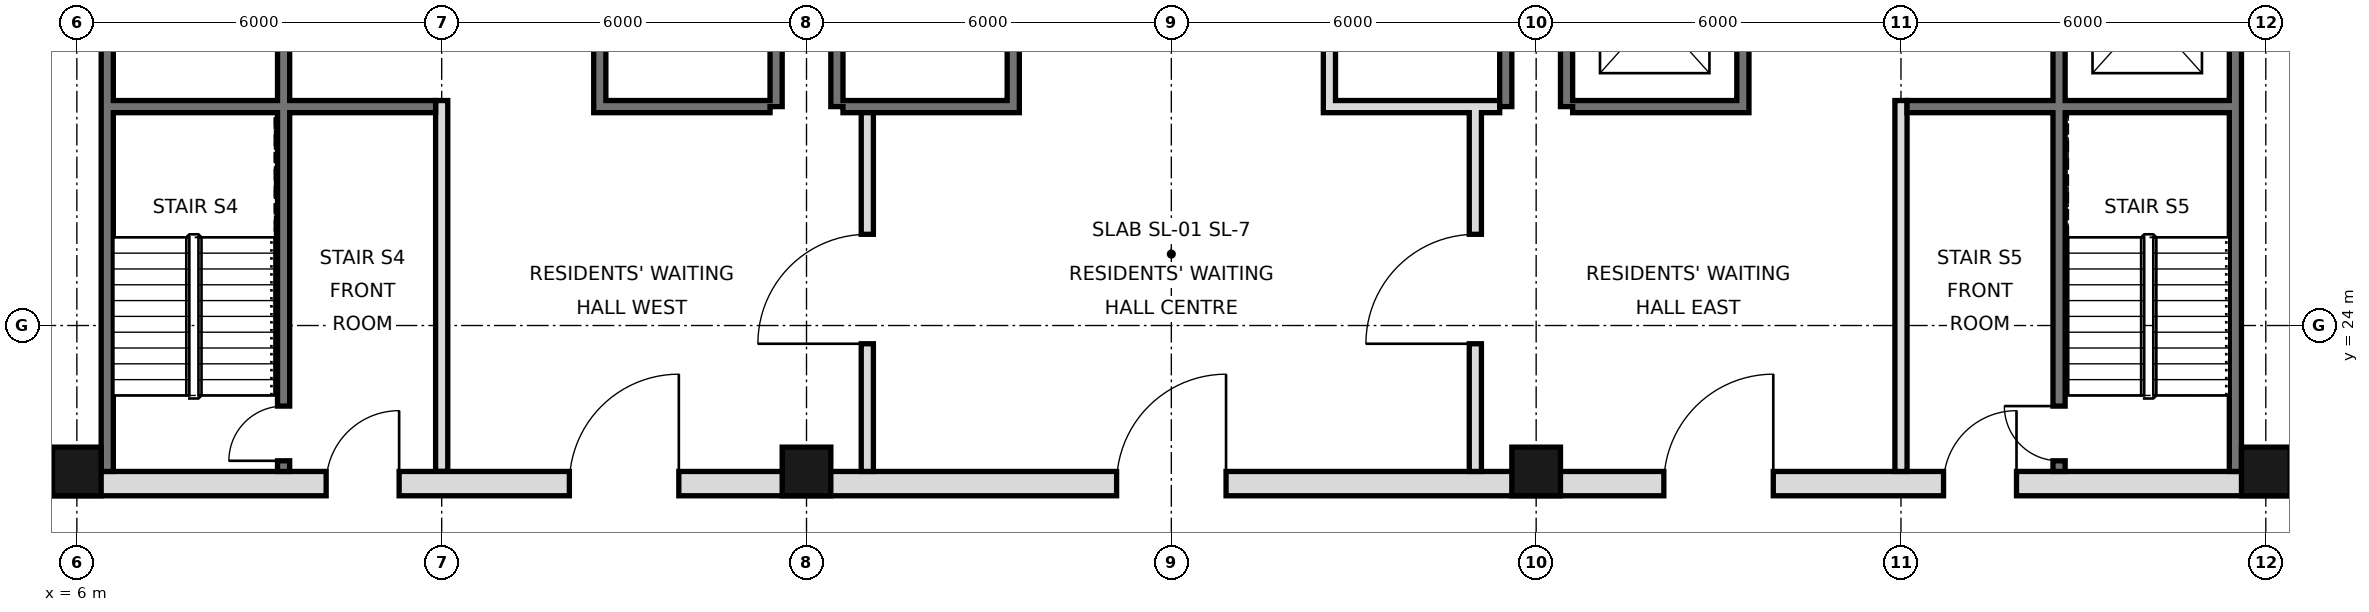
"""IFC4 building model, lengths in metres.
Left out: names, types, materials, properties, quantities, classifications, styles, units other than length and angle.
Written with IfcOpenShell. Run it as: python <this file> out.ifc"""

import sys

from ifc_helpers import new_model, si_unit, direction, frame, frame_2d, origin, origin_2d, place, context, subcontext, project, spatial, rectangle, hollow_rectangle, extrude, element, fill, save


model = new_model("IFC4")
c1 = context("Model", 3, precision=1e-05, world=origin(), true_north=direction((0.0, 1.0)))
c2 = subcontext(c1, "Body", "Model", "MODEL_VIEW")
j1 = project(units=[si_unit("LENGTHUNIT", "METRE"), si_unit("PLANEANGLEUNIT", "RADIAN")], contexts=[c1])
p1 = place(None, origin())
s1 = spatial("IfcSite", under=j1, at=p1, CompositionType="ELEMENT")
p2 = place(p1, origin())
s2 = spatial("IfcBuilding", under=s1, at=p2, CompositionType="ELEMENT")
p3 = place(p2, frame((0.0, 0.0, 167.2)))
s3 = spatial("IfcBuildingStorey", under=s2, at=p3, CompositionType="ELEMENT", Elevation=167.2)
for number, where, z_axis, x_axis in (
    (1, (6.0, 21.6, 0.0), (0.0, 0.0, 1.0), (1.0, 0.0, 0.0)),
    (2, (18.0, 21.6, 0.0), (0.0, 0.0, 1.0), (1.0, 0.0, 0.0)),
    (3, (30.0, 21.6, 0.0), (0.0, 0.0, 1.0), (1.0, 0.0, 0.0)),
    (4, (42.0, 21.6, 0.0), (0.0, 0.0, 1.0), (1.0, 0.0, 0.0)),
):
    element("IfcColumn", number, at=place(p3, frame(where, z_axis=z_axis, x_axis=x_axis)), inside=s3, PredefinedType="COLUMN", context=c2, shape_type="SweptSolid", body=[
        extrude(hollow_rectangle(XDim=0.8, YDim=0.8, WallThickness=0.045, at=origin_2d()), origin(), (0.0, 0.0, 1.0), 3.6),
    ])
for number, where, z_axis, x_axis in (
    (5, (6.5, 21.6, 0.0), (0.0, 0.0, 1.0), (0.0, 1.0, 0.0)),
    (6, (41.5, 21.6, 0.0), (0.0, 0.0, 1.0), (0.0, 1.0, 0.0)),
):
    element("IfcWall", number, at=place(p3, frame(where, z_axis=z_axis, x_axis=x_axis)), inside=s3, PredefinedType="SOLIDWALL", context=c2, shape_type="SweptSolid", body=[
        extrude(rectangle(XDim=23.5, YDim=0.2, at=frame_2d((11.75, 0.0))), origin(), (0.0, 0.0, 1.0), 3.42),
    ])
for number, where, z_axis, x_axis in (
    (7, (17.5, 27.6, 0.0), (0.0, 0.0, 1.0), (0.0, 1.0, 0.0)),
    (8, (18.5, 27.6, 0.0), (0.0, 0.0, 1.0), (0.0, 1.0, 0.0)),
    (9, (29.5, 27.6, 0.0), (0.0, 0.0, 1.0), (0.0, 1.0, 0.0)),
    (10, (30.5, 27.6, 0.0), (0.0, 0.0, 1.0), (0.0, 1.0, 0.0)),
):
    element("IfcWall", number, at=place(p3, frame(where, z_axis=z_axis, x_axis=x_axis)), inside=s3, PredefinedType="SOLIDWALL", context=c2, shape_type="SweptSolid", body=[
        extrude(rectangle(XDim=17.5, YDim=0.2, at=frame_2d((8.75, 0.0))), origin(), (0.0, 0.0, 1.0), 3.42),
    ])
p4 = place(p3, frame((5.6, 21.4, 0.0), z_axis=(0.0, 0.0, 1.0), x_axis=(1.0, 0.0, 0.0)))
e11 = element("IfcWall", 11, at=p4, inside=s3, PredefinedType="SOLIDWALL", context=c2, shape_type="SweptSolid", body=[
    extrude(rectangle(XDim=36.8, YDim=0.4, at=frame_2d((18.4, 0.0))), origin(), (0.0, 0.0, 1.0), 3.42),
])
p5 = place(p4, frame((8.5, 0.0, 0.0)))
e12 = element("IfcOpeningElement", 12, at=p5, cuts=e11, PredefinedType="OPENING", context=c2, shape_type="SweptSolid", body=[
    extrude(rectangle(XDim=1.8, YDim=2.1, at=frame_2d((0.9, 1.05))), frame((0.0, 0.21, 0.0), z_axis=(0.0, -1.0, 0.0), x_axis=(1.0, 0.0, 0.0)), (0.0, 0.0, 1.0), 0.42),
])
p6 = place(p4, frame((17.5, 0.0, 0.0)))
e13 = element("IfcOpeningElement", 13, at=p6, cuts=e11, PredefinedType="OPENING", context=c2, shape_type="SweptSolid", body=[
    extrude(rectangle(XDim=1.8, YDim=2.1, at=frame_2d((0.9, 1.05))), frame((0.0, 0.21, 0.0), z_axis=(0.0, -1.0, 0.0), x_axis=(1.0, 0.0, 0.0)), (0.0, 0.0, 1.0), 0.42),
])
p7 = place(p4, frame((26.5, 0.0, 0.0)))
e14 = element("IfcOpeningElement", 14, at=p7, cuts=e11, PredefinedType="OPENING", context=c2, shape_type="SweptSolid", body=[
    extrude(rectangle(XDim=1.8, YDim=2.1, at=frame_2d((0.9, 1.05))), frame((0.0, 0.21, 0.0), z_axis=(0.0, -1.0, 0.0), x_axis=(1.0, 0.0, 0.0)), (0.0, 0.0, 1.0), 0.42),
])
p8 = place(p4, frame((4.5, 0.0, 0.0)))
e15 = element("IfcOpeningElement", 15, at=p8, cuts=e11, PredefinedType="OPENING", context=c2, shape_type="SweptSolid", body=[
    extrude(rectangle(XDim=1.2, YDim=2.1, at=frame_2d((0.6, 1.05))), frame((0.0, 0.21, 0.0), z_axis=(0.0, -1.0, 0.0), x_axis=(1.0, 0.0, 0.0)), (0.0, 0.0, 1.0), 0.42),
])
p9 = place(p4, frame((31.1, 0.0, 0.0)))
e16 = element("IfcOpeningElement", 16, at=p9, cuts=e11, PredefinedType="OPENING", context=c2, shape_type="SweptSolid", body=[
    extrude(rectangle(XDim=1.2, YDim=2.1, at=frame_2d((0.6, 1.05))), frame((0.0, 0.21, 0.0), z_axis=(0.0, -1.0, 0.0), x_axis=(1.0, 0.0, 0.0)), (0.0, 0.0, 1.0), 0.42),
])
p10 = place(p3, frame((19.0, 21.6, 0.0), z_axis=(0.0, 0.0, 1.0), x_axis=(0.0, 1.0, 0.0)))
e17 = element("IfcWall", 17, at=p10, inside=s3, PredefinedType="PARTITIONING", context=c2, shape_type="SweptSolid", body=[
    extrude(rectangle(XDim=6.0, YDim=0.2, at=frame_2d((3.0, 0.0))), origin(), (0.0, 0.0, 1.0), 3.42),
])
p11 = place(p10, frame((2.1, 0.0, 0.0)))
e18 = element("IfcOpeningElement", 18, at=p11, cuts=e17, PredefinedType="OPENING", context=c2, shape_type="SweptSolid", body=[
    extrude(rectangle(XDim=1.8, YDim=2.1, at=frame_2d((0.9, 1.05))), frame((0.0, 0.11, 0.0), z_axis=(0.0, -1.0, 0.0), x_axis=(1.0, 0.0, 0.0)), (0.0, 0.0, 1.0), 0.22),
])
p12 = place(p3, frame((29.0, 21.6, 0.0), z_axis=(0.0, 0.0, 1.0), x_axis=(0.0, 1.0, 0.0)))
e19 = element("IfcWall", 19, at=p12, inside=s3, PredefinedType="PARTITIONING", context=c2, shape_type="SweptSolid", body=[
    extrude(rectangle(XDim=6.0, YDim=0.2, at=frame_2d((3.0, 0.0))), origin(), (0.0, 0.0, 1.0), 3.42),
])
p13 = place(p12, frame((2.1, 0.0, 0.0)))
e20 = element("IfcOpeningElement", 20, at=p13, cuts=e19, PredefinedType="OPENING", context=c2, shape_type="SweptSolid", body=[
    extrude(rectangle(XDim=1.8, YDim=2.1, at=frame_2d((0.9, 1.05))), frame((0.0, 0.11, 0.0), z_axis=(0.0, -1.0, 0.0), x_axis=(1.0, 0.0, 0.0)), (0.0, 0.0, 1.0), 0.22),
])
p14 = place(p3, frame((12.0, 21.6, 0.0), z_axis=(0.0, 0.0, 1.0), x_axis=(0.0, 1.0, 0.0)))
e21 = element("IfcWall", 21, at=p14, inside=s3, PredefinedType="PARTITIONING", context=c2, shape_type="SweptSolid", body=[
    extrude(rectangle(XDim=6.1, YDim=0.2, at=frame_2d((3.05, 0.0))), origin(), (0.0, 0.0, 1.0), 3.42),
])
p15 = place(p3, frame((14.6, 27.5, 0.0), z_axis=(0.0, 0.0, 1.0), x_axis=(0.0, 1.0, 0.0)))
e22 = element("IfcWall", 22, at=p15, inside=s3, PredefinedType="SOLIDWALL", context=c2, shape_type="SweptSolid", body=[
    extrude(rectangle(XDim=17.5, YDim=0.2, at=frame_2d((8.75, 0.0))), origin(), (0.0, 0.0, 1.0), 3.42),
])
p16 = place(p15, frame((15.4, 0.0, 0.0)))
e23 = element("IfcOpeningElement", 23, at=p16, cuts=e22, PredefinedType="OPENING", context=c2, shape_type="SweptSolid", body=[
    extrude(rectangle(XDim=1.1, YDim=2.1, at=frame_2d((0.55, 1.05))), frame((0.0, 0.11, 0.0), z_axis=(0.0, -1.0, 0.0), x_axis=(1.0, 0.0, 0.0)), (0.0, 0.0, 1.0), 0.22),
])
p17 = place(p15, frame((9.9, 0.0, 0.0)))
e24 = element("IfcOpeningElement", 24, at=p17, cuts=e22, PredefinedType="OPENING", context=c2, shape_type="SweptSolid", body=[
    extrude(rectangle(XDim=0.9, YDim=2.1, at=frame_2d((0.45, 1.05))), frame((0.0, 0.11, 0.0), z_axis=(0.0, -1.0, 0.0), x_axis=(1.0, 0.0, 0.0)), (0.0, 0.0, 1.0), 0.22),
])
p18 = place(p3, frame((21.4, 27.5, 0.0), z_axis=(0.0, 0.0, 1.0), x_axis=(0.0, 1.0, 0.0)))
e25 = element("IfcWall", 25, at=p18, inside=s3, PredefinedType="SOLIDWALL", context=c2, shape_type="SweptSolid", body=[
    extrude(rectangle(XDim=17.5, YDim=0.2, at=frame_2d((8.75, 0.0))), origin(), (0.0, 0.0, 1.0), 3.42),
])
p19 = place(p18, frame((9.8, 0.0, 0.0)))
e26 = element("IfcOpeningElement", 26, at=p19, cuts=e25, PredefinedType="OPENING", context=c2, shape_type="SweptSolid", body=[
    extrude(rectangle(XDim=1.0, YDim=2.1, at=frame_2d((0.5, 1.05))), frame((0.0, 0.11, 0.0), z_axis=(0.0, -1.0, 0.0), x_axis=(1.0, 0.0, 0.0)), (0.0, 0.0, 1.0), 0.22),
])
p20 = place(p18, frame((7.4, 0.0, 0.0)))
e27 = element("IfcOpeningElement", 27, at=p20, cuts=e25, PredefinedType="OPENING", context=c2, shape_type="SweptSolid", body=[
    extrude(rectangle(XDim=0.9, YDim=2.1, at=frame_2d((0.45, 1.05))), frame((0.0, 0.11, 0.0), z_axis=(0.0, -1.0, 0.0), x_axis=(1.0, 0.0, 0.0)), (0.0, 0.0, 1.0), 0.22),
])
p21 = place(p3, frame((26.6, 27.5, 0.0), z_axis=(0.0, 0.0, 1.0), x_axis=(0.0, 1.0, 0.0)))
e28 = element("IfcWall", 28, at=p21, inside=s3, PredefinedType="SOLIDWALL", context=c2, shape_type="SweptSolid", body=[
    extrude(rectangle(XDim=17.5, YDim=0.2, at=frame_2d((8.75, 0.0))), origin(), (0.0, 0.0, 1.0), 3.42),
])
p22 = place(p21, frame((4.3, 0.0, 0.0)))
e29 = element("IfcOpeningElement", 29, at=p22, cuts=e28, PredefinedType="OPENING", context=c2, shape_type="SweptSolid", body=[
    extrude(rectangle(XDim=0.9, YDim=2.1, at=frame_2d((0.45, 1.05))), frame((0.0, 0.11, 0.0), z_axis=(0.0, -1.0, 0.0), x_axis=(1.0, 0.0, 0.0)), (0.0, 0.0, 1.0), 0.22),
])
p23 = place(p21, frame((10.35, 0.0, 0.0)))
e30 = element("IfcOpeningElement", 30, at=p23, cuts=e28, PredefinedType="OPENING", context=c2, shape_type="SweptSolid", body=[
    extrude(rectangle(XDim=1.0, YDim=2.1, at=frame_2d((0.5, 1.05))), frame((0.0, 0.11, 0.0), z_axis=(0.0, -1.0, 0.0), x_axis=(1.0, 0.0, 0.0)), (0.0, 0.0, 1.0), 0.22),
])
p24 = place(p21, frame((15.475, 0.0, 0.0)))
e31 = element("IfcOpeningElement", 31, at=p24, cuts=e28, PredefinedType="OPENING", context=c2, shape_type="SweptSolid", body=[
    extrude(rectangle(XDim=1.0, YDim=2.1, at=frame_2d((0.5, 1.05))), frame((0.0, 0.11, 0.0), z_axis=(0.0, -1.0, 0.0), x_axis=(1.0, 0.0, 0.0)), (0.0, 0.0, 1.0), 0.22),
])
p25 = place(p3, frame((33.4, 27.5, 0.0), z_axis=(0.0, 0.0, 1.0), x_axis=(0.0, 1.0, 0.0)))
e32 = element("IfcWall", 32, at=p25, inside=s3, PredefinedType="SOLIDWALL", context=c2, shape_type="SweptSolid", body=[
    extrude(rectangle(XDim=17.5, YDim=0.2, at=frame_2d((8.75, 0.0))), origin(), (0.0, 0.0, 1.0), 3.42),
])
p26 = place(p25, frame((1.1, 0.0, 0.0)))
e33 = element("IfcOpeningElement", 33, at=p26, cuts=e32, PredefinedType="OPENING", context=c2, shape_type="SweptSolid", body=[
    extrude(rectangle(XDim=1.1, YDim=2.1, at=frame_2d((0.55, 1.05))), frame((0.0, 0.11, 0.0), z_axis=(0.0, -1.0, 0.0), x_axis=(1.0, 0.0, 0.0)), (0.0, 0.0, 1.0), 0.22),
])
p27 = place(p25, frame((4.2, 0.0, 0.0)))
e34 = element("IfcOpeningElement", 34, at=p27, cuts=e32, PredefinedType="OPENING", context=c2, shape_type="SweptSolid", body=[
    extrude(rectangle(XDim=1.1, YDim=2.1, at=frame_2d((0.55, 1.05))), frame((0.0, 0.11, 0.0), z_axis=(0.0, -1.0, 0.0), x_axis=(1.0, 0.0, 0.0)), (0.0, 0.0, 1.0), 0.22),
])
p28 = place(p25, frame((15.4, 0.0, 0.0)))
e35 = element("IfcOpeningElement", 35, at=p28, cuts=e32, PredefinedType="OPENING", context=c2, shape_type="SweptSolid", body=[
    extrude(rectangle(XDim=1.1, YDim=2.1, at=frame_2d((0.55, 1.05))), frame((0.0, 0.11, 0.0), z_axis=(0.0, -1.0, 0.0), x_axis=(1.0, 0.0, 0.0)), (0.0, 0.0, 1.0), 0.22),
])
p29 = place(p25, frame((9.9, 0.0, 0.0)))
e36 = element("IfcOpeningElement", 36, at=p29, cuts=e32, PredefinedType="OPENING", context=c2, shape_type="SweptSolid", body=[
    extrude(rectangle(XDim=0.9, YDim=2.1, at=frame_2d((0.45, 1.05))), frame((0.0, 0.11, 0.0), z_axis=(0.0, -1.0, 0.0), x_axis=(1.0, 0.0, 0.0)), (0.0, 0.0, 1.0), 0.22),
])
p30 = place(p3, frame((36.0, 21.6, 0.0), z_axis=(0.0, 0.0, 1.0), x_axis=(0.0, 1.0, 0.0)))
e37 = element("IfcWall", 37, at=p30, inside=s3, PredefinedType="PARTITIONING", context=c2, shape_type="SweptSolid", body=[
    extrude(rectangle(XDim=6.1, YDim=0.2, at=frame_2d((3.05, 0.0))), origin(), (0.0, 0.0, 1.0), 3.42),
])
p31 = place(p3, frame((38.6, 21.6, 0.0), z_axis=(0.0, 0.0, 1.0), x_axis=(0.0, 1.0, 0.0)))
e38 = element("IfcWall", 38, at=p31, inside=s3, PredefinedType="SOLIDWALL", context=c2, shape_type="SweptSolid", body=[
    extrude(rectangle(XDim=23.4, YDim=0.2, at=frame_2d((11.7, 0.0))), origin(), (0.0, 0.0, 1.0), 3.42),
])
p32 = place(p31, frame((7.0, 0.0, 0.0)))
e39 = element("IfcOpeningElement", 39, at=p32, cuts=e38, PredefinedType="OPENING", context=c2, shape_type="SweptSolid", body=[
    extrude(rectangle(XDim=1.1, YDim=2.1, at=frame_2d((0.55, 1.05))), frame((0.0, 0.11, 0.0), z_axis=(0.0, -1.0, 0.0), x_axis=(1.0, 0.0, 0.0)), (0.0, 0.0, 1.0), 0.22),
])
p33 = place(p31, frame((10.1, 0.0, 0.0)))
e40 = element("IfcOpeningElement", 40, at=p33, cuts=e38, PredefinedType="OPENING", context=c2, shape_type="SweptSolid", body=[
    extrude(rectangle(XDim=1.1, YDim=2.1, at=frame_2d((0.55, 1.05))), frame((0.0, 0.11, 0.0), z_axis=(0.0, -1.0, 0.0), x_axis=(1.0, 0.0, 0.0)), (0.0, 0.0, 1.0), 0.22),
])
p34 = place(p31, frame((13.2, 0.0, 0.0)))
e41 = element("IfcOpeningElement", 41, at=p34, cuts=e38, PredefinedType="OPENING", context=c2, shape_type="SweptSolid", body=[
    extrude(rectangle(XDim=1.1, YDim=2.1, at=frame_2d((0.55, 1.05))), frame((0.0, 0.11, 0.0), z_axis=(0.0, -1.0, 0.0), x_axis=(1.0, 0.0, 0.0)), (0.0, 0.0, 1.0), 0.22),
])
p35 = place(p31, frame((15.7, 0.0, 0.0)))
e42 = element("IfcOpeningElement", 42, at=p35, cuts=e38, PredefinedType="OPENING", context=c2, shape_type="SweptSolid", body=[
    extrude(rectangle(XDim=1.0, YDim=2.1, at=frame_2d((0.5, 1.05))), frame((0.0, 0.11, 0.0), z_axis=(0.0, -1.0, 0.0), x_axis=(1.0, 0.0, 0.0)), (0.0, 0.0, 1.0), 0.22),
])
p36 = place(p31, frame((0.175, 0.0, 0.0)))
e43 = element("IfcOpeningElement", 43, at=p36, cuts=e38, PredefinedType="OPENING", context=c2, shape_type="SweptSolid", body=[
    extrude(rectangle(XDim=0.9, YDim=2.1, at=frame_2d((0.45, 1.05))), frame((0.0, 0.11, 0.0), z_axis=(0.0, -1.0, 0.0), x_axis=(1.0, 0.0, 0.0)), (0.0, 0.0, 1.0), 0.22),
])
p37 = place(p3, frame((9.4, 21.6, 0.0), z_axis=(0.0, 0.0, 1.0), x_axis=(0.0, 1.0, 0.0)))
e44 = element("IfcWall", 44, at=p37, inside=s3, PredefinedType="SOLIDWALL", context=c2, shape_type="SweptSolid", body=[
    extrude(rectangle(XDim=23.4, YDim=0.2, at=frame_2d((11.7, 0.0))), origin(), (0.0, 0.0, 1.0), 3.42),
])
p38 = place(p37, frame((15.7, 0.0, 0.0)))
e45 = element("IfcOpeningElement", 45, at=p38, cuts=e44, PredefinedType="OPENING", context=c2, shape_type="SweptSolid", body=[
    extrude(rectangle(XDim=1.0, YDim=2.1, at=frame_2d((0.5, 1.05))), frame((0.0, 0.11, 0.0), z_axis=(0.0, -1.0, 0.0), x_axis=(1.0, 0.0, 0.0)), (0.0, 0.0, 1.0), 0.22),
])
p39 = place(p37, frame((0.175, 0.0, 0.0)))
e46 = element("IfcOpeningElement", 46, at=p39, cuts=e44, PredefinedType="OPENING", context=c2, shape_type="SweptSolid", body=[
    extrude(rectangle(XDim=0.9, YDim=2.1, at=frame_2d((0.45, 1.05))), frame((0.0, 0.11, 0.0), z_axis=(0.0, -1.0, 0.0), x_axis=(1.0, 0.0, 0.0)), (0.0, 0.0, 1.0), 0.22),
])
for number, where, z_axis, x_axis in (
    (47, (14.7, 27.6, 0.0), (0.0, 0.0, 1.0), (1.0, 0.0, 0.0)),
    (48, (18.6, 27.6, 0.0), (0.0, 0.0, 1.0), (1.0, 0.0, 0.0)),
    (49, (26.7, 27.6, 0.0), (0.0, 0.0, 1.0), (1.0, 0.0, 0.0)),
    (50, (30.6, 27.6, 0.0), (0.0, 0.0, 1.0), (1.0, 0.0, 0.0)),
):
    element("IfcWall", number, at=place(p3, frame(where, z_axis=z_axis, x_axis=x_axis)), inside=s3, PredefinedType="SOLIDWALL", context=c2, shape_type="SweptSolid", body=[
        extrude(rectangle(XDim=2.7, YDim=0.2, at=frame_2d((1.35, 0.0))), origin(), (0.0, 0.0, 1.0), 3.42),
    ])
for number, where, z_axis, x_axis in (
    (51, (36.1, 27.6, 0.0), (0.0, 0.0, 1.0), (1.0, 0.0, 0.0)),
    (52, (6.6, 27.6, 0.0), (0.0, 0.0, 1.0), (1.0, 0.0, 0.0)),
):
    element("IfcWall", number, at=place(p3, frame(where, z_axis=z_axis, x_axis=x_axis)), inside=s3, PredefinedType="SOLIDWALL", context=c2, shape_type="SweptSolid", body=[
        extrude(rectangle(XDim=5.3, YDim=0.2, at=frame_2d((2.65, 0.0))), origin(), (0.0, 0.0, 1.0), 3.42),
    ])
p40 = place(p5, frame((1.8, 0.0, 0.0), z_axis=(0.0, 0.0, 1.0), x_axis=(-1.0, 0.0, 0.0)))
e53 = element("IfcDoor", 53, at=p40, inside=s3, OperationType="SINGLE_SWING_LEFT", PredefinedType="DOOR", context=c2, shape_type="SweptSolid", body=[
    extrude(rectangle(XDim=1.8, YDim=2.1, at=frame_2d((0.9, 1.05))), frame((0.0, 0.025, 0.0), z_axis=(0.0, -1.0, 0.0), x_axis=(1.0, 0.0, 0.0)), (0.0, 0.0, 1.0), 0.05),
])
fill(e12, e53)
p41 = place(p11, origin())
e54 = element("IfcDoor", 54, at=p41, inside=s3, OperationType="SINGLE_SWING_LEFT", PredefinedType="DOOR", context=c2, shape_type="SweptSolid", body=[
    extrude(rectangle(XDim=1.8, YDim=2.1, at=frame_2d((0.9, 1.05))), frame((0.0, 0.025, 0.0), z_axis=(0.0, -1.0, 0.0), x_axis=(1.0, 0.0, 0.0)), (0.0, 0.0, 1.0), 0.05),
])
fill(e18, e54)
p42 = place(p6, frame((1.8, 0.0, 0.0), z_axis=(0.0, 0.0, 1.0), x_axis=(-1.0, 0.0, 0.0)))
e55 = element("IfcDoor", 55, at=p42, inside=s3, OperationType="SINGLE_SWING_LEFT", PredefinedType="DOOR", context=c2, shape_type="SweptSolid", body=[
    extrude(rectangle(XDim=1.8, YDim=2.1, at=frame_2d((0.9, 1.05))), frame((0.0, 0.025, 0.0), z_axis=(0.0, -1.0, 0.0), x_axis=(1.0, 0.0, 0.0)), (0.0, 0.0, 1.0), 0.05),
])
fill(e13, e55)
p43 = place(p13, origin())
e56 = element("IfcDoor", 56, at=p43, inside=s3, OperationType="SINGLE_SWING_LEFT", PredefinedType="DOOR", context=c2, shape_type="SweptSolid", body=[
    extrude(rectangle(XDim=1.8, YDim=2.1, at=frame_2d((0.9, 1.05))), frame((0.0, 0.025, 0.0), z_axis=(0.0, -1.0, 0.0), x_axis=(1.0, 0.0, 0.0)), (0.0, 0.0, 1.0), 0.05),
])
fill(e20, e56)
p44 = place(p7, frame((1.8, 0.0, 0.0), z_axis=(0.0, 0.0, 1.0), x_axis=(-1.0, 0.0, 0.0)))
e57 = element("IfcDoor", 57, at=p44, inside=s3, OperationType="SINGLE_SWING_LEFT", PredefinedType="DOOR", context=c2, shape_type="SweptSolid", body=[
    extrude(rectangle(XDim=1.8, YDim=2.1, at=frame_2d((0.9, 1.05))), frame((0.0, 0.025, 0.0), z_axis=(0.0, -1.0, 0.0), x_axis=(1.0, 0.0, 0.0)), (0.0, 0.0, 1.0), 0.05),
])
fill(e14, e57)
p45 = place(p8, frame((1.2, 0.0, 0.0), z_axis=(0.0, 0.0, 1.0), x_axis=(-1.0, 0.0, 0.0)))
e58 = element("IfcDoor", 58, at=p45, inside=s3, OperationType="SINGLE_SWING_LEFT", PredefinedType="DOOR", context=c2, shape_type="SweptSolid", body=[
    extrude(rectangle(XDim=1.2, YDim=2.1, at=frame_2d((0.6, 1.05))), frame((0.0, 0.025, 0.0), z_axis=(0.0, -1.0, 0.0), x_axis=(1.0, 0.0, 0.0)), (0.0, 0.0, 1.0), 0.05),
])
fill(e15, e58)
p46 = place(p9, frame((1.2, 0.0, 0.0), z_axis=(0.0, 0.0, 1.0), x_axis=(-1.0, 0.0, 0.0)))
e59 = element("IfcDoor", 59, at=p46, inside=s3, OperationType="SINGLE_SWING_LEFT", PredefinedType="DOOR", context=c2, shape_type="SweptSolid", body=[
    extrude(rectangle(XDim=1.2, YDim=2.1, at=frame_2d((0.6, 1.05))), frame((0.0, 0.025, 0.0), z_axis=(0.0, -1.0, 0.0), x_axis=(1.0, 0.0, 0.0)), (0.0, 0.0, 1.0), 0.05),
])
fill(e16, e59)
p47 = place(p39, origin())
e60 = element("IfcDoor", 60, at=p47, inside=s3, OperationType="SINGLE_SWING_LEFT", PredefinedType="DOOR", context=c2, shape_type="SweptSolid", body=[
    extrude(rectangle(XDim=0.9, YDim=2.1, at=frame_2d((0.45, 1.05))), frame((0.0, 0.025, 0.0), z_axis=(0.0, -1.0, 0.0), x_axis=(1.0, 0.0, 0.0)), (0.0, 0.0, 1.0), 0.05),
])
fill(e46, e60)
p48 = place(p36, frame((0.9, 0.0, 0.0), z_axis=(0.0, 0.0, 1.0), x_axis=(-1.0, 0.0, 0.0)))
e61 = element("IfcDoor", 61, at=p48, inside=s3, OperationType="SINGLE_SWING_LEFT", PredefinedType="DOOR", context=c2, shape_type="SweptSolid", body=[
    extrude(rectangle(XDim=0.9, YDim=2.1, at=frame_2d((0.45, 1.05))), frame((0.0, 0.025, 0.0), z_axis=(0.0, -1.0, 0.0), x_axis=(1.0, 0.0, 0.0)), (0.0, 0.0, 1.0), 0.05),
])
fill(e43, e61)
save(model, sys.argv[1])
